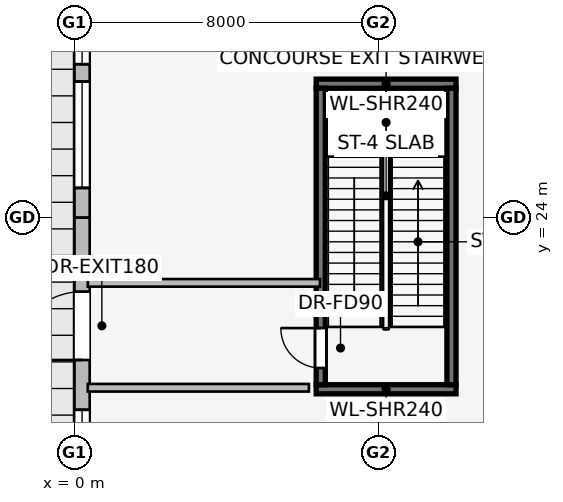
"""IFC4 building model, lengths in metres.
Left out: names, types, materials, properties, quantities, classifications, styles, units other than length and angle.
Written with IfcOpenShell. Run it as: python <this file> out.ifc"""

import sys

from ifc_helpers import new_model, si_unit, direction, frame, frame_2d, origin, place, context, subcontext, project, spatial, rectangle, extrude, element, fill, save


model = new_model("IFC4")
c1 = context("Model", 3, precision=1e-05, world=origin(), true_north=direction((0.0, 1.0)))
c2 = subcontext(c1, "Body", "Model", "MODEL_VIEW")
j1 = project(units=[si_unit("LENGTHUNIT", "METRE"), si_unit("PLANEANGLEUNIT", "RADIAN")], contexts=[c1])
p1 = place(None, origin())
s1 = spatial("IfcSite", under=j1, at=p1, CompositionType="ELEMENT")
p2 = place(p1, origin())
s2 = spatial("IfcBuilding", under=s1, at=p2, CompositionType="ELEMENT")
p3 = place(p2, origin())
s3 = spatial("IfcBuildingStorey", under=s2, at=p3, CompositionType="ELEMENT", Elevation=0.0)
for number, where, z_axis, x_axis in (
    (1, (6.36, 19.48, 0.0), (0.0, 0.0, 1.0), (1.0, 0.0, 0.0)),
    (2, (10.04, 27.52, 0.0), (0.0, 0.0, 1.0), (-1.0, 0.0, 0.0)),
):
    element("IfcWall", number, at=place(p3, frame(where, z_axis=z_axis, x_axis=x_axis)), inside=s3, PredefinedType="SHEAR", context=c2, shape_type="SweptSolid", body=[
        extrude(rectangle(XDim=3.68, YDim=0.24, at=frame_2d((1.84, 0.0))), origin(), (0.0, 0.0, 1.0), 6.0),
    ])
p4 = place(p3, frame((9.92, 19.6, 0.0), z_axis=(0.0, 0.0, 1.0), x_axis=(0.0, 1.0, 0.0)))
e3 = element("IfcWall", 3, at=p4, inside=s3, PredefinedType="SHEAR", context=c2, shape_type="SweptSolid", body=[
    extrude(rectangle(XDim=7.8, YDim=0.24, at=frame_2d((3.9, 0.0))), origin(), (0.0, 0.0, 1.0), 6.0),
])
p5 = place(p3, frame((6.48, 19.6, 0.0), z_axis=(0.0, 0.0, 1.0), x_axis=(0.0, 1.0, 0.0)))
e4 = element("IfcWall", 4, at=p5, inside=s3, PredefinedType="SHEAR", context=c2, shape_type="SweptSolid", body=[
    extrude(rectangle(XDim=7.8, YDim=0.24, at=frame_2d((3.9, 0.0))), origin(), (0.0, 0.0, 1.0), 6.0),
])
p6 = place(p5, frame((0.44, 0.0, 0.0)))
e5 = element("IfcOpeningElement", 5, at=p6, cuts=e4, PredefinedType="OPENING", context=c2, shape_type="SweptSolid", body=[
    extrude(rectangle(XDim=1.05, YDim=2.0, at=frame_2d((0.525, 1.0))), frame((0.0, 0.13, 0.0), z_axis=(0.0, -1.0, 0.0), x_axis=(1.0, 0.0, 0.0)), (0.0, 0.0, 1.0), 0.26),
])
p7 = place(p3, frame((0.2, 0.4, 0.0), z_axis=(0.0, 0.0, 1.0), x_axis=(0.0, 1.0, 0.0)))
e6 = element("IfcWall", 6, at=p7, inside=s3, PredefinedType="STANDARD", context=c2, shape_type="SweptSolid", body=[
    extrude(rectangle(XDim=23.6, YDim=0.4, at=frame_2d((11.8, 0.0))), origin(), (0.0, 0.0, 1.0), 5.69),
])
p8 = place(p7, frame((19.85, 0.0, 0.0)))
e7 = element("IfcOpeningElement", 7, at=p8, cuts=e6, PredefinedType="OPENING", context=c2, shape_type="SweptSolid", body=[
    extrude(rectangle(XDim=1.8, YDim=2.3, at=frame_2d((0.9, 1.15))), frame((0.0, 0.21, 0.0), z_axis=(0.0, -1.0, 0.0), x_axis=(1.0, 0.0, 0.0)), (0.0, 0.0, 1.0), 0.42),
])
p9 = place(p7, frame((2.243, 0.0, 0.75)))
e8 = element("IfcOpeningElement", 8, at=p9, cuts=e6, PredefinedType="OPENING", context=c2, shape_type="SweptSolid", body=[
    extrude(rectangle(XDim=2.8, YDim=1.8, at=frame_2d((1.4, 0.9))), frame((0.0, 0.21, 0.0), z_axis=(0.0, -1.0, 0.0), x_axis=(1.0, 0.0, 0.0)), (0.0, 0.0, 1.0), 0.42),
])
p10 = place(p7, frame((6.65, 0.0, 0.75)))
e9 = element("IfcOpeningElement", 9, at=p10, cuts=e6, PredefinedType="OPENING", context=c2, shape_type="SweptSolid", body=[
    extrude(rectangle(XDim=2.8, YDim=1.8, at=frame_2d((1.4, 0.9))), frame((0.0, 0.21, 0.0), z_axis=(0.0, -1.0, 0.0), x_axis=(1.0, 0.0, 0.0)), (0.0, 0.0, 1.0), 0.42),
])
p11 = place(p7, frame((11.057, 0.0, 0.75)))
e10 = element("IfcOpeningElement", 10, at=p11, cuts=e6, PredefinedType="OPENING", context=c2, shape_type="SweptSolid", body=[
    extrude(rectangle(XDim=2.8, YDim=1.8, at=frame_2d((1.4, 0.9))), frame((0.0, 0.21, 0.0), z_axis=(0.0, -1.0, 0.0), x_axis=(1.0, 0.0, 0.0)), (0.0, 0.0, 1.0), 0.42),
])
p12 = place(p7, frame((16.74, 0.0, 0.75)))
e11 = element("IfcOpeningElement", 11, at=p12, cuts=e6, PredefinedType="OPENING", context=c2, shape_type="SweptSolid", body=[
    extrude(rectangle(XDim=1.8, YDim=1.5, at=frame_2d((0.9, 0.75))), frame((0.0, 0.21, 0.0), z_axis=(0.0, -1.0, 0.0), x_axis=(1.0, 0.0, 0.0)), (0.0, 0.0, 1.0), 0.42),
])
p13 = place(p3, frame((0.2, 24.0, 0.0), z_axis=(0.0, 0.0, 1.0), x_axis=(0.0, 1.0, 0.0)))
e12 = element("IfcWall", 12, at=p13, inside=s3, PredefinedType="STANDARD", context=c2, shape_type="SweptSolid", body=[
    extrude(rectangle(XDim=23.6, YDim=0.4, at=frame_2d((11.8, 0.0))), origin(), (0.0, 0.0, 1.0), 5.69),
])
p14 = place(p13, frame((0.778, 0.0, 0.75)))
e13 = element("IfcOpeningElement", 13, at=p14, cuts=e12, PredefinedType="OPENING", context=c2, shape_type="SweptSolid", body=[
    extrude(rectangle(XDim=2.8, YDim=1.8, at=frame_2d((1.4, 0.9))), frame((0.0, 0.21, 0.0), z_axis=(0.0, -1.0, 0.0), x_axis=(1.0, 0.0, 0.0)), (0.0, 0.0, 1.0), 0.42),
])
p15 = place(p13, frame((4.033, 0.0, 0.75)))
e14 = element("IfcOpeningElement", 14, at=p15, cuts=e12, PredefinedType="OPENING", context=c2, shape_type="SweptSolid", body=[
    extrude(rectangle(XDim=2.8, YDim=1.8, at=frame_2d((1.4, 0.9))), frame((0.0, 0.21, 0.0), z_axis=(0.0, -1.0, 0.0), x_axis=(1.0, 0.0, 0.0)), (0.0, 0.0, 1.0), 0.42),
])
p16 = place(p13, frame((10.243, 0.0, 0.75)))
e15 = element("IfcOpeningElement", 15, at=p16, cuts=e12, PredefinedType="OPENING", context=c2, shape_type="SweptSolid", body=[
    extrude(rectangle(XDim=1.8, YDim=1.5, at=frame_2d((0.9, 0.75))), frame((0.0, 0.21, 0.0), z_axis=(0.0, -1.0, 0.0), x_axis=(1.0, 0.0, 0.0)), (0.0, 0.0, 1.0), 0.42),
])
p17 = place(p13, frame((14.65, 0.0, 0.75)))
e16 = element("IfcOpeningElement", 16, at=p17, cuts=e12, PredefinedType="OPENING", context=c2, shape_type="SweptSolid", body=[
    extrude(rectangle(XDim=1.8, YDim=1.5, at=frame_2d((0.9, 0.75))), frame((0.0, 0.21, 0.0), z_axis=(0.0, -1.0, 0.0), x_axis=(1.0, 0.0, 0.0)), (0.0, 0.0, 1.0), 0.42),
])
p18 = place(p13, frame((19.057, 0.0, 0.75)))
e17 = element("IfcOpeningElement", 17, at=p18, cuts=e12, PredefinedType="OPENING", context=c2, shape_type="SweptSolid", body=[
    extrude(rectangle(XDim=1.8, YDim=1.5, at=frame_2d((0.9, 0.75))), frame((0.0, 0.21, 0.0), z_axis=(0.0, -1.0, 0.0), x_axis=(1.0, 0.0, 0.0)), (0.0, 0.0, 1.0), 0.42),
])
p19 = place(p3, frame((0.35, 19.52, 0.0), z_axis=(0.0, 0.0, 1.0), x_axis=(1.0, 0.0, 0.0)))
e18 = element("IfcWall", 18, at=p19, inside=s3, PredefinedType="PARTITIONING", context=c2, shape_type="SweptSolid", body=[
    extrude(rectangle(XDim=5.819, YDim=0.2, at=frame_2d((2.909, 0.0))), origin(), (0.0, 0.0, 1.0), 5.69),
])
p20 = place(p3, frame((6.46, 22.28, 0.0), z_axis=(0.0, 0.0, 1.0), x_axis=(-1.0, 0.0, 0.0)))
e19 = element("IfcWall", 19, at=p20, inside=s3, PredefinedType="PARTITIONING", context=c2, shape_type="SweptSolid", body=[
    extrude(rectangle(XDim=6.11, YDim=0.2, at=frame_2d((3.055, 0.0))), origin(), (0.0, 0.0, 1.0), 5.69),
])
p21 = place(p8, origin())
e20 = element("IfcDoor", 20, at=p21, inside=s3, OperationType="SINGLE_SWING_LEFT", PredefinedType="DOOR", context=c2, shape_type="SweptSolid", body=[
    extrude(rectangle(XDim=1.8, YDim=2.3, at=frame_2d((0.9, 1.15))), frame((0.0, 0.025, 0.0), z_axis=(0.0, -1.0, 0.0), x_axis=(1.0, 0.0, 0.0)), (0.0, 0.0, 1.0), 0.05),
])
fill(e7, e20)
p22 = place(p12, origin())
e21 = element("IfcWindow", 21, at=p22, inside=s3, PartitioningType="SINGLE_PANEL", PredefinedType="WINDOW", context=c2, shape_type="SweptSolid", body=[
    extrude(rectangle(XDim=1.8, YDim=1.5, at=frame_2d((0.9, 0.75))), frame((0.0, 0.03, 0.0), z_axis=(0.0, -1.0, 0.0), x_axis=(1.0, 0.0, 0.0)), (0.0, 0.0, 1.0), 0.06),
])
fill(e11, e21)
p23 = place(p14, origin())
e22 = element("IfcWindow", 22, at=p23, inside=s3, PartitioningType="SINGLE_PANEL", PredefinedType="WINDOW", context=c2, shape_type="SweptSolid", body=[
    extrude(rectangle(XDim=2.8, YDim=1.8, at=frame_2d((1.4, 0.9))), frame((0.0, 0.03, 0.0), z_axis=(0.0, -1.0, 0.0), x_axis=(1.0, 0.0, 0.0)), (0.0, 0.0, 1.0), 0.06),
])
fill(e13, e22)
p24 = place(p15, origin())
e23 = element("IfcWindow", 23, at=p24, inside=s3, PartitioningType="SINGLE_PANEL", PredefinedType="WINDOW", context=c2, shape_type="SweptSolid", body=[
    extrude(rectangle(XDim=2.8, YDim=1.8, at=frame_2d((1.4, 0.9))), frame((0.0, 0.03, 0.0), z_axis=(0.0, -1.0, 0.0), x_axis=(1.0, 0.0, 0.0)), (0.0, 0.0, 1.0), 0.06),
])
fill(e14, e23)
p25 = place(p6, origin())
e24 = element("IfcDoor", 24, at=p25, inside=s3, OperationType="SINGLE_SWING_RIGHT", PredefinedType="DOOR", context=c2, shape_type="SweptSolid", body=[
    extrude(rectangle(XDim=1.05, YDim=2.0, at=frame_2d((0.525, 1.0))), frame((0.0, 0.025, 0.0), z_axis=(0.0, -1.0, 0.0), x_axis=(1.0, 0.0, 0.0)), (0.0, 0.0, 1.0), 0.05),
])
fill(e5, e24)
save(model, sys.argv[1])
